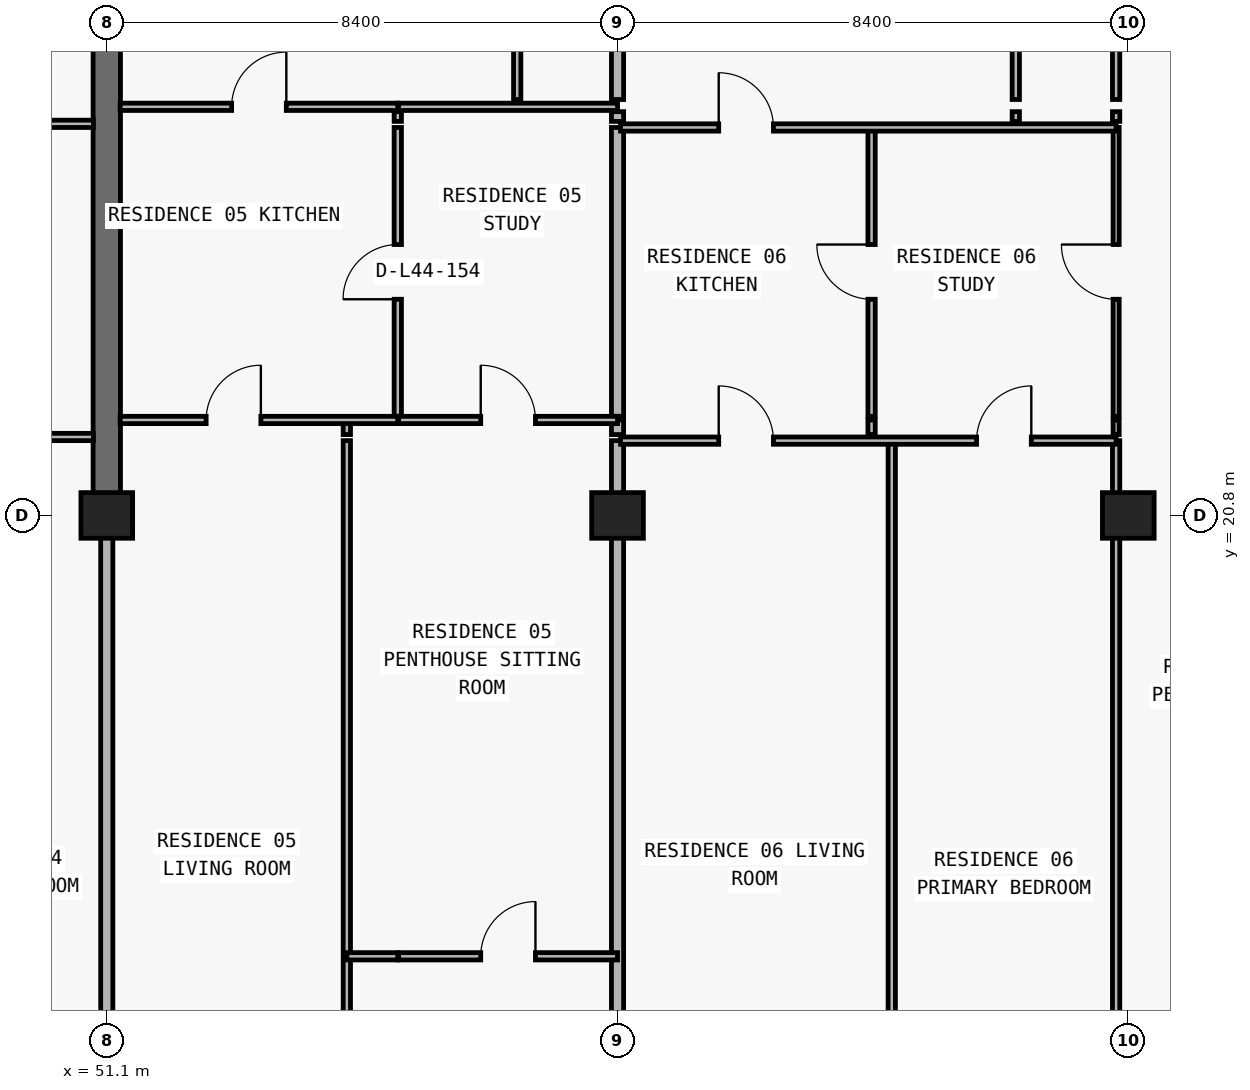
"""IFC4 building model, lengths in metres.
Left out: names, types, materials, properties, quantities, classifications, styles, units other than length and angle.
Written with IfcOpenShell. Run it as: python <this file> out.ifc"""

import sys

from ifc_helpers import new_model, si_unit, direction, frame, frame_2d, origin, origin_2d, place, context, subcontext, project, spatial, rectangle, extrude, element, fill, save


model = new_model("IFC4")
c1 = context("Model", 3, precision=1e-05, world=origin(), true_north=direction((0.0, 1.0)))
c2 = subcontext(c1, "Body", "Model", "MODEL_VIEW")
j1 = project(units=[si_unit("LENGTHUNIT", "METRE"), si_unit("PLANEANGLEUNIT", "RADIAN")], contexts=[c1])
p1 = place(None, origin())
s1 = spatial("IfcSite", under=j1, at=p1, CompositionType="ELEMENT")
p2 = place(p1, origin())
s2 = spatial("IfcBuilding", under=s1, at=p2, CompositionType="ELEMENT")
p3 = place(p2, frame((0.0, 0.0, 160.5)))
s3 = spatial("IfcBuildingStorey", under=s2, at=p3, CompositionType="ELEMENT", Elevation=160.5)
for number, where, z_axis, x_axis in (
    (1, (51.1, 20.8, 0.0), (0.0, 0.0, 1.0), (1.0, 0.0, 0.0)),
    (2, (59.5, 20.8, 0.0), (0.0, 0.0, 1.0), (1.0, 0.0, 0.0)),
    (3, (67.9, 20.8, 0.0), (0.0, 0.0, 1.0), (1.0, 0.0, 0.0)),
):
    element("IfcColumn", number, at=place(p3, frame(where, z_axis=z_axis, x_axis=x_axis)), inside=s3, PredefinedType="COLUMN", context=c2, shape_type="SweptSolid", body=[
        extrude(rectangle(XDim=0.85, YDim=0.75, at=origin_2d()), origin(), (0.0, 0.0, 1.0), 3.05),
    ])
p4 = place(p3, frame((51.1, 20.8, 0.0), z_axis=(0.0, 0.0, 1.0), x_axis=(0.0, 1.0, 0.0)))
e4 = element("IfcWall", 4, at=p4, inside=s3, PredefinedType="SHEAR", context=c2, shape_type="SweptSolid", body=[
    extrude(rectangle(XDim=8.6, YDim=0.45, at=frame_2d((4.3, 0.0))), origin(), (0.0, 0.0, 1.0), 3.05),
])
p5 = place(p3, frame((51.1, 11.24, 0.0), z_axis=(0.0, 0.0, 1.0), x_axis=(0.0, 1.0, 0.0)))
e5 = element("IfcWall", 5, at=p5, inside=s3, PredefinedType="PARTITIONING", context=c2, shape_type="SweptSolid", body=[
    extrude(rectangle(XDim=9.555, YDim=0.2, at=frame_2d((4.777, 0.0))), origin(), (0.0, 0.0, 1.0), 2.263),
])
p6 = place(p3, frame((55.048, 11.24, 0.0), z_axis=(0.0, 0.0, 1.0), x_axis=(0.0, 1.0, 0.0)))
e6 = element("IfcWall", 6, at=p6, inside=s3, PredefinedType="PARTITIONING", context=c2, shape_type="SweptSolid", body=[
    extrude(rectangle(XDim=10.79, YDim=0.12, at=frame_2d((5.395, 0.0))), origin(), (0.0, 0.0, 1.0), 3.05),
])
p7 = place(p3, frame((55.048, 22.13, 0.0), z_axis=(0.0, 0.0, 1.0), x_axis=(0.0, 1.0, 0.0)))
e7 = element("IfcWall", 7, at=p7, inside=s3, PredefinedType="PARTITIONING", context=c2, shape_type="SweptSolid", body=[
    extrude(rectangle(XDim=0.24, YDim=0.12, at=frame_2d((0.12, 0.0))), origin(), (0.0, 0.0, 1.0), 3.05),
])
p8 = place(p3, frame((55.886, 22.43, 0.0), z_axis=(0.0, 0.0, 1.0), x_axis=(0.0, 1.0, 0.0)))
e8 = element("IfcWall", 8, at=p8, inside=s3, PredefinedType="PARTITIONING", context=c2, shape_type="SweptSolid", body=[
    extrude(rectangle(XDim=4.75, YDim=0.12, at=frame_2d((2.375, 0.0))), origin(), (0.0, 0.0, 1.0), 3.05),
])
p9 = place(p8, frame((1.925, 0.0, 0.0)))
e9 = element("IfcOpeningElement", 9, at=p9, cuts=e8, PredefinedType="OPENING", context=c2, shape_type="SweptSolid", body=[
    extrude(rectangle(XDim=0.9, YDim=2.15, at=frame_2d((0.45, 1.075))), frame((0.0, 0.07, 0.0), z_axis=(0.0, -1.0, 0.0), x_axis=(1.0, 0.0, 0.0)), (0.0, 0.0, 1.0), 0.14),
])
p10 = place(p3, frame((55.886, 27.28, 0.0), z_axis=(0.0, 0.0, 1.0), x_axis=(0.0, 1.0, 0.0)))
e10 = element("IfcWall", 10, at=p10, inside=s3, PredefinedType="PARTITIONING", context=c2, shape_type="SweptSolid", body=[
    extrude(rectangle(XDim=0.16, YDim=0.12, at=frame_2d((0.08, 0.0))), origin(), (0.0, 0.0, 1.0), 3.05),
])
p11 = place(p3, frame((57.85, 27.64, 0.0), z_axis=(0.0, 0.0, 1.0), x_axis=(0.0, 1.0, 0.0)))
e11 = element("IfcWall", 11, at=p11, inside=s3, PredefinedType="PARTITIONING", context=c2, shape_type="SweptSolid", body=[
    extrude(rectangle(XDim=6.56, YDim=0.12, at=frame_2d((3.28, 0.0))), origin(), (0.0, 0.0, 1.0), 3.05),
])
p12 = place(p11, frame((2.855, 0.0, 0.0)))
e12 = element("IfcOpeningElement", 12, at=p12, cuts=e11, PredefinedType="OPENING", context=c2, shape_type="SweptSolid", body=[
    extrude(rectangle(XDim=0.85, YDim=2.1, at=frame_2d((0.425, 1.05))), frame((0.0, 0.07, 0.0), z_axis=(0.0, -1.0, 0.0), x_axis=(1.0, 0.0, 0.0)), (0.0, 0.0, 1.0), 0.14),
])
p13 = place(p3, frame((59.5, 11.24, 0.0), z_axis=(0.0, 0.0, 1.0), x_axis=(0.0, 1.0, 0.0)))
e13 = element("IfcWall", 13, at=p13, inside=s3, PredefinedType="PARTITIONING", context=c2, shape_type="SweptSolid", body=[
    extrude(rectangle(XDim=10.79, YDim=0.2, at=frame_2d((5.395, 0.0))), origin(), (0.0, 0.0, 1.0), 2.263),
])
p14 = place(p3, frame((59.5, 22.13, 0.0), z_axis=(0.0, 0.0, 1.0), x_axis=(0.0, 1.0, 0.0)))
e14 = element("IfcWall", 14, at=p14, inside=s3, PredefinedType="PARTITIONING", context=c2, shape_type="SweptSolid", body=[
    extrude(rectangle(XDim=0.24, YDim=0.2, at=frame_2d((0.12, 0.0))), origin(), (0.0, 0.0, 1.0), 2.263),
])
p15 = place(p3, frame((59.5, 22.43, 0.0), z_axis=(0.0, 0.0, 1.0), x_axis=(0.0, 1.0, 0.0)))
e15 = element("IfcWall", 15, at=p15, inside=s3, PredefinedType="PARTITIONING", context=c2, shape_type="SweptSolid", body=[
    extrude(rectangle(XDim=4.75, YDim=0.2, at=frame_2d((2.375, 0.0))), origin(), (0.0, 0.0, 1.0), 2.263),
])
p16 = place(p3, frame((59.5, 27.28, 0.0), z_axis=(0.0, 0.0, 1.0), x_axis=(0.0, 1.0, 0.0)))
e16 = element("IfcWall", 16, at=p16, inside=s3, PredefinedType="PARTITIONING", context=c2, shape_type="SweptSolid", body=[
    extrude(rectangle(XDim=0.16, YDim=0.2, at=frame_2d((0.08, 0.0))), origin(), (0.0, 0.0, 1.0), 2.263),
])
p17 = place(p3, frame((59.5, 27.64, 0.0), z_axis=(0.0, 0.0, 1.0), x_axis=(0.0, 1.0, 0.0)))
e17 = element("IfcWall", 17, at=p17, inside=s3, PredefinedType="PARTITIONING", context=c2, shape_type="SweptSolid", body=[
    extrude(rectangle(XDim=6.56, YDim=0.2, at=frame_2d((3.28, 0.0))), origin(), (0.0, 0.0, 1.0), 2.263),
])
p18 = place(p3, frame((63.678, 22.13, 0.0), z_axis=(0.0, 0.0, 1.0), x_axis=(0.0, 1.0, 0.0)))
e18 = element("IfcWall", 18, at=p18, inside=s3, PredefinedType="PARTITIONING", context=c2, shape_type="SweptSolid", body=[
    extrude(rectangle(XDim=0.24, YDim=0.12, at=frame_2d((0.12, 0.0))), origin(), (0.0, 0.0, 1.0), 3.05),
])
p19 = place(p3, frame((63.678, 22.43, 0.0), z_axis=(0.0, 0.0, 1.0), x_axis=(0.0, 1.0, 0.0)))
e19 = element("IfcWall", 19, at=p19, inside=s3, PredefinedType="PARTITIONING", context=c2, shape_type="SweptSolid", body=[
    extrude(rectangle(XDim=4.75, YDim=0.12, at=frame_2d((2.375, 0.0))), origin(), (0.0, 0.0, 1.0), 3.05),
])
p20 = place(p19, frame((1.925, 0.0, 0.0)))
e20 = element("IfcOpeningElement", 20, at=p20, cuts=e19, PredefinedType="OPENING", context=c2, shape_type="SweptSolid", body=[
    extrude(rectangle(XDim=0.9, YDim=2.15, at=frame_2d((0.45, 1.075))), frame((0.0, 0.07, 0.0), z_axis=(0.0, -1.0, 0.0), x_axis=(1.0, 0.0, 0.0)), (0.0, 0.0, 1.0), 0.14),
])
p21 = place(p3, frame((64.01, 11.24, 0.0), z_axis=(0.0, 0.0, 1.0), x_axis=(0.0, 1.0, 0.0)))
e21 = element("IfcWall", 21, at=p21, inside=s3, PredefinedType="PARTITIONING", context=c2, shape_type="SweptSolid", body=[
    extrude(rectangle(XDim=10.79, YDim=0.12, at=frame_2d((5.395, 0.0))), origin(), (0.0, 0.0, 1.0), 3.05),
])
p22 = place(p3, frame((66.05, 27.28, 0.0), z_axis=(0.0, 0.0, 1.0), x_axis=(0.0, 1.0, 0.0)))
e22 = element("IfcWall", 22, at=p22, inside=s3, PredefinedType="PARTITIONING", context=c2, shape_type="SweptSolid", body=[
    extrude(rectangle(XDim=0.16, YDim=0.12, at=frame_2d((0.08, 0.0))), origin(), (0.0, 0.0, 1.0), 3.05),
])
p23 = place(p3, frame((66.05, 27.64, 0.0), z_axis=(0.0, 0.0, 1.0), x_axis=(0.0, 1.0, 0.0)))
e23 = element("IfcWall", 23, at=p23, inside=s3, PredefinedType="PARTITIONING", context=c2, shape_type="SweptSolid", body=[
    extrude(rectangle(XDim=6.56, YDim=0.12, at=frame_2d((3.28, 0.0))), origin(), (0.0, 0.0, 1.0), 3.05),
])
p24 = place(p23, frame((2.855, 0.0, 0.0)))
e24 = element("IfcOpeningElement", 24, at=p24, cuts=e23, PredefinedType="OPENING", context=c2, shape_type="SweptSolid", body=[
    extrude(rectangle(XDim=0.85, YDim=2.1, at=frame_2d((0.425, 1.05))), frame((0.0, 0.07, 0.0), z_axis=(0.0, -1.0, 0.0), x_axis=(1.0, 0.0, 0.0)), (0.0, 0.0, 1.0), 0.14),
])
p25 = place(p3, frame((67.7, 11.32, 0.0), z_axis=(0.0, 0.0, 1.0), x_axis=(0.0, 1.0, 0.0)))
e25 = element("IfcWall", 25, at=p25, inside=s3, PredefinedType="PARTITIONING", context=c2, shape_type="SweptSolid", body=[
    extrude(rectangle(XDim=10.71, YDim=0.12, at=frame_2d((5.355, 0.0))), origin(), (0.0, 0.0, 1.0), 2.263),
])
p26 = place(p3, frame((67.7, 22.13, 0.0), z_axis=(0.0, 0.0, 1.0), x_axis=(0.0, 1.0, 0.0)))
e26 = element("IfcWall", 26, at=p26, inside=s3, PredefinedType="MOVABLE", context=c2, shape_type="SweptSolid", body=[
    extrude(rectangle(XDim=0.24, YDim=0.1, at=frame_2d((0.12, 0.0))), origin(), (0.0, 0.0, 1.0), 2.263),
])
p27 = place(p3, frame((67.7, 22.43, 0.0), z_axis=(0.0, 0.0, 1.0), x_axis=(0.0, 1.0, 0.0)))
e27 = element("IfcWall", 27, at=p27, inside=s3, PredefinedType="MOVABLE", context=c2, shape_type="SweptSolid", body=[
    extrude(rectangle(XDim=4.75, YDim=0.1, at=frame_2d((2.375, 0.0))), origin(), (0.0, 0.0, 1.0), 2.263),
])
p28 = place(p27, frame((1.925, 0.0, 0.0)))
e28 = element("IfcOpeningElement", 28, at=p28, cuts=e27, PredefinedType="OPENING", context=c2, shape_type="SweptSolid", body=[
    extrude(rectangle(XDim=0.9, YDim=2.15, at=frame_2d((0.45, 1.075))), frame((0.0, 0.06, 0.0), z_axis=(0.0, -1.0, 0.0), x_axis=(1.0, 0.0, 0.0)), (0.0, 0.0, 1.0), 0.12),
])
p29 = place(p3, frame((67.7, 27.28, 0.0), z_axis=(0.0, 0.0, 1.0), x_axis=(0.0, 1.0, 0.0)))
e29 = element("IfcWall", 29, at=p29, inside=s3, PredefinedType="PARTITIONING", context=c2, shape_type="SweptSolid", body=[
    extrude(rectangle(XDim=0.16, YDim=0.12, at=frame_2d((0.08, 0.0))), origin(), (0.0, 0.0, 1.0), 2.263),
])
p30 = place(p3, frame((67.7, 27.64, 0.0), z_axis=(0.0, 0.0, 1.0), x_axis=(0.0, 1.0, 0.0)))
e30 = element("IfcWall", 30, at=p30, inside=s3, PredefinedType="PARTITIONING", context=c2, shape_type="SweptSolid", body=[
    extrude(rectangle(XDim=6.56, YDim=0.12, at=frame_2d((3.28, 0.0))), origin(), (0.0, 0.0, 1.0), 2.263),
])
p31 = place(p3, frame((55.048, 13.55, 0.0), z_axis=(0.0, 0.0, 1.0), x_axis=(1.0, 0.0, 0.0)))
e31 = element("IfcWall", 31, at=p31, inside=s3, PredefinedType="PARTITIONING", context=c2, shape_type="SweptSolid", body=[
    extrude(rectangle(XDim=0.838, YDim=0.12, at=frame_2d((0.419, 0.0))), origin(), (0.0, 0.0, 1.0), 3.05),
])
p32 = place(p3, frame((55.9, 13.55, 0.0), z_axis=(0.0, 0.0, 1.0), x_axis=(1.0, 0.0, 0.0)))
e32 = element("IfcWall", 32, at=p32, inside=s3, PredefinedType="PARTITIONING", context=c2, shape_type="SweptSolid", body=[
    extrude(rectangle(XDim=3.6, YDim=0.12, at=frame_2d((1.8, 0.0))), origin(), (0.0, 0.0, 1.0), 3.05),
])
p33 = place(p32, frame((1.35, 0.0, 0.0)))
e33 = element("IfcOpeningElement", 33, at=p33, cuts=e32, PredefinedType="OPENING", context=c2, shape_type="SweptSolid", body=[
    extrude(rectangle(XDim=0.9, YDim=2.15, at=frame_2d((0.45, 1.075))), frame((0.0, 0.07, 0.0), z_axis=(0.0, -1.0, 0.0), x_axis=(1.0, 0.0, 0.0)), (0.0, 0.0, 1.0), 0.14),
])
p34 = place(p3, frame((59.55, 22.03, 0.0), z_axis=(0.0, 0.0, 1.0), x_axis=(1.0, 0.0, 0.0)))
e34 = element("IfcWall", 34, at=p34, inside=s3, PredefinedType="PARTITIONING", context=c2, shape_type="SweptSolid", body=[
    extrude(rectangle(XDim=8.15, YDim=0.12, at=frame_2d((4.075, 0.0))), origin(), (0.0, 0.0, 1.0), 3.05),
])
p35 = place(p34, frame((1.614, 0.0, 0.0)))
e35 = element("IfcOpeningElement", 35, at=p35, cuts=e34, PredefinedType="OPENING", context=c2, shape_type="SweptSolid", body=[
    extrude(rectangle(XDim=0.9, YDim=2.15, at=frame_2d((0.45, 1.075))), frame((0.0, 0.07, 0.0), z_axis=(0.0, -1.0, 0.0), x_axis=(1.0, 0.0, 0.0)), (0.0, 0.0, 1.0), 0.14),
])
p36 = place(p34, frame((5.855, 0.0, 0.0)))
e36 = element("IfcOpeningElement", 36, at=p36, cuts=e34, PredefinedType="OPENING", context=c2, shape_type="SweptSolid", body=[
    extrude(rectangle(XDim=0.9, YDim=2.15, at=frame_2d((0.45, 1.075))), frame((0.0, 0.07, 0.0), z_axis=(0.0, -1.0, 0.0), x_axis=(1.0, 0.0, 0.0)), (0.0, 0.0, 1.0), 0.14),
])
p37 = place(p3, frame((42.7, 22.09, 0.0), z_axis=(0.0, 0.0, 1.0), x_axis=(1.0, 0.0, 0.0)))
e37 = element("IfcWall", 37, at=p37, inside=s3, PredefinedType="PARTITIONING", context=c2, shape_type="SweptSolid", body=[
    extrude(rectangle(XDim=8.18, YDim=0.12, at=frame_2d((4.09, 0.0))), origin(), (0.0, 0.0, 1.0), 3.05),
])
p38 = place(p37, frame((1.818, 0.0, 0.0)))
e38 = element("IfcOpeningElement", 38, at=p38, cuts=e37, PredefinedType="OPENING", context=c2, shape_type="SweptSolid", body=[
    extrude(rectangle(XDim=0.9, YDim=2.15, at=frame_2d((0.45, 1.075))), frame((0.0, 0.07, 0.0), z_axis=(0.0, -1.0, 0.0), x_axis=(1.0, 0.0, 0.0)), (0.0, 0.0, 1.0), 0.14),
])
p39 = place(p37, frame((5.95, 0.0, 0.0)))
e39 = element("IfcOpeningElement", 39, at=p39, cuts=e37, PredefinedType="OPENING", context=c2, shape_type="SweptSolid", body=[
    extrude(rectangle(XDim=0.9, YDim=2.15, at=frame_2d((0.45, 1.075))), frame((0.0, 0.07, 0.0), z_axis=(0.0, -1.0, 0.0), x_axis=(1.0, 0.0, 0.0)), (0.0, 0.0, 1.0), 0.14),
])
p40 = place(p3, frame((51.32, 22.37, 0.0), z_axis=(0.0, 0.0, 1.0), x_axis=(1.0, 0.0, 0.0)))
e40 = element("IfcWall", 40, at=p40, inside=s3, PredefinedType="PARTITIONING", context=c2, shape_type="SweptSolid", body=[
    extrude(rectangle(XDim=4.566, YDim=0.12, at=frame_2d((2.283, 0.0))), origin(), (0.0, 0.0, 1.0), 3.05),
])
p41 = place(p40, frame((1.414, 0.0, 0.0)))
e41 = element("IfcOpeningElement", 41, at=p41, cuts=e40, PredefinedType="OPENING", context=c2, shape_type="SweptSolid", body=[
    extrude(rectangle(XDim=0.9, YDim=2.15, at=frame_2d((0.45, 1.075))), frame((0.0, 0.07, 0.0), z_axis=(0.0, -1.0, 0.0), x_axis=(1.0, 0.0, 0.0)), (0.0, 0.0, 1.0), 0.14),
])
p42 = place(p3, frame((55.9, 22.37, 0.0), z_axis=(0.0, 0.0, 1.0), x_axis=(1.0, 0.0, 0.0)))
e42 = element("IfcWall", 42, at=p42, inside=s3, PredefinedType="PARTITIONING", context=c2, shape_type="SweptSolid", body=[
    extrude(rectangle(XDim=3.6, YDim=0.12, at=frame_2d((1.8, 0.0))), origin(), (0.0, 0.0, 1.0), 3.05),
])
p43 = place(p42, frame((1.35, 0.0, 0.0)))
e43 = element("IfcOpeningElement", 43, at=p43, cuts=e42, PredefinedType="OPENING", context=c2, shape_type="SweptSolid", body=[
    extrude(rectangle(XDim=0.9, YDim=2.15, at=frame_2d((0.45, 1.075))), frame((0.0, 0.07, 0.0), z_axis=(0.0, -1.0, 0.0), x_axis=(1.0, 0.0, 0.0)), (0.0, 0.0, 1.0), 0.14),
])
p44 = place(p3, frame((59.55, 27.18, 0.0), z_axis=(0.0, 0.0, 1.0), x_axis=(1.0, 0.0, 0.0)))
e44 = element("IfcWall", 44, at=p44, inside=s3, PredefinedType="PARTITIONING", context=c2, shape_type="SweptSolid", body=[
    extrude(rectangle(XDim=8.15, YDim=0.12, at=frame_2d((4.075, 0.0))), origin(), (0.0, 0.0, 1.0), 3.05),
])
p45 = place(p44, frame((1.614, 0.0, 0.0)))
e45 = element("IfcOpeningElement", 45, at=p45, cuts=e44, PredefinedType="OPENING", context=c2, shape_type="SweptSolid", body=[
    extrude(rectangle(XDim=0.9, YDim=2.15, at=frame_2d((0.45, 1.075))), frame((0.0, 0.07, 0.0), z_axis=(0.0, -1.0, 0.0), x_axis=(1.0, 0.0, 0.0)), (0.0, 0.0, 1.0), 0.14),
])
p46 = place(p3, frame((42.7, 27.24, 0.0), z_axis=(0.0, 0.0, 1.0), x_axis=(1.0, 0.0, 0.0)))
e46 = element("IfcWall", 46, at=p46, inside=s3, PredefinedType="PARTITIONING", context=c2, shape_type="SweptSolid", body=[
    extrude(rectangle(XDim=8.18, YDim=0.12, at=frame_2d((4.09, 0.0))), origin(), (0.0, 0.0, 1.0), 3.05),
])
p47 = place(p46, frame((1.818, 0.0, 0.0)))
e47 = element("IfcOpeningElement", 47, at=p47, cuts=e46, PredefinedType="OPENING", context=c2, shape_type="SweptSolid", body=[
    extrude(rectangle(XDim=0.9, YDim=2.15, at=frame_2d((0.45, 1.075))), frame((0.0, 0.07, 0.0), z_axis=(0.0, -1.0, 0.0), x_axis=(1.0, 0.0, 0.0)), (0.0, 0.0, 1.0), 0.14),
])
p48 = place(p3, frame((51.32, 27.52, 0.0), z_axis=(0.0, 0.0, 1.0), x_axis=(1.0, 0.0, 0.0)))
e48 = element("IfcWall", 48, at=p48, inside=s3, PredefinedType="PARTITIONING", context=c2, shape_type="SweptSolid", body=[
    extrude(rectangle(XDim=4.566, YDim=0.12, at=frame_2d((2.283, 0.0))), origin(), (0.0, 0.0, 1.0), 3.05),
])
p49 = place(p48, frame((1.833, 0.0, 0.0)))
e49 = element("IfcOpeningElement", 49, at=p49, cuts=e48, PredefinedType="OPENING", context=c2, shape_type="SweptSolid", body=[
    extrude(rectangle(XDim=0.9, YDim=2.15, at=frame_2d((0.45, 1.075))), frame((0.0, 0.07, 0.0), z_axis=(0.0, -1.0, 0.0), x_axis=(1.0, 0.0, 0.0)), (0.0, 0.0, 1.0), 0.14),
])
p50 = place(p3, frame((55.9, 27.52, 0.0), z_axis=(0.0, 0.0, 1.0), x_axis=(1.0, 0.0, 0.0)))
e50 = element("IfcWall", 50, at=p50, inside=s3, PredefinedType="PARTITIONING", context=c2, shape_type="SweptSolid", body=[
    extrude(rectangle(XDim=3.6, YDim=0.12, at=frame_2d((1.8, 0.0))), origin(), (0.0, 0.0, 1.0), 3.05),
])
p51 = place(p49, origin())
e51 = element("IfcDoor", 51, at=p51, inside=s3, OperationType="SINGLE_SWING_RIGHT", PredefinedType="DOOR", context=c2, shape_type="SweptSolid", body=[
    extrude(rectangle(XDim=0.9, YDim=2.15, at=frame_2d((0.45, 1.075))), frame((0.0, 0.025, 0.0), z_axis=(0.0, -1.0, 0.0), x_axis=(1.0, 0.0, 0.0)), (0.0, 0.0, 1.0), 0.05),
])
fill(e49, e51)
p52 = place(p9, origin())
e52 = element("IfcDoor", 52, at=p52, inside=s3, OperationType="SINGLE_SWING_LEFT", PredefinedType="DOOR", context=c2, shape_type="SweptSolid", body=[
    extrude(rectangle(XDim=0.9, YDim=2.15, at=frame_2d((0.45, 1.075))), frame((0.0, 0.025, 0.0), z_axis=(0.0, -1.0, 0.0), x_axis=(1.0, 0.0, 0.0)), (0.0, 0.0, 1.0), 0.05),
])
fill(e9, e52)
p53 = place(p41, origin())
e53 = element("IfcDoor", 53, at=p53, inside=s3, OperationType="SINGLE_SWING_RIGHT", PredefinedType="DOOR", context=c2, shape_type="SweptSolid", body=[
    extrude(rectangle(XDim=0.9, YDim=2.15, at=frame_2d((0.45, 1.075))), frame((0.0, 0.025, 0.0), z_axis=(0.0, -1.0, 0.0), x_axis=(1.0, 0.0, 0.0)), (0.0, 0.0, 1.0), 0.05),
])
fill(e41, e53)
p54 = place(p43, origin())
e54 = element("IfcDoor", 54, at=p54, inside=s3, OperationType="SINGLE_SWING_LEFT", PredefinedType="DOOR", context=c2, shape_type="SweptSolid", body=[
    extrude(rectangle(XDim=0.9, YDim=2.15, at=frame_2d((0.45, 1.075))), frame((0.0, 0.025, 0.0), z_axis=(0.0, -1.0, 0.0), x_axis=(1.0, 0.0, 0.0)), (0.0, 0.0, 1.0), 0.05),
])
fill(e43, e54)
p55 = place(p33, origin())
e55 = element("IfcDoor", 55, at=p55, inside=s3, OperationType="SINGLE_SWING_RIGHT", PredefinedType="DOOR", context=c2, shape_type="SweptSolid", body=[
    extrude(rectangle(XDim=0.9, YDim=2.15, at=frame_2d((0.45, 1.075))), frame((0.0, 0.025, 0.0), z_axis=(0.0, -1.0, 0.0), x_axis=(1.0, 0.0, 0.0)), (0.0, 0.0, 1.0), 0.05),
])
fill(e33, e55)
p56 = place(p45, origin())
e56 = element("IfcDoor", 56, at=p56, inside=s3, OperationType="SINGLE_SWING_LEFT", PredefinedType="DOOR", context=c2, shape_type="SweptSolid", body=[
    extrude(rectangle(XDim=0.9, YDim=2.15, at=frame_2d((0.45, 1.075))), frame((0.0, 0.025, 0.0), z_axis=(0.0, -1.0, 0.0), x_axis=(1.0, 0.0, 0.0)), (0.0, 0.0, 1.0), 0.05),
])
fill(e45, e56)
p57 = place(p20, origin())
e57 = element("IfcDoor", 57, at=p57, inside=s3, OperationType="SINGLE_SWING_RIGHT", PredefinedType="DOOR", context=c2, shape_type="SweptSolid", body=[
    extrude(rectangle(XDim=0.9, YDim=2.15, at=frame_2d((0.45, 1.075))), frame((0.0, 0.025, 0.0), z_axis=(0.0, -1.0, 0.0), x_axis=(1.0, 0.0, 0.0)), (0.0, 0.0, 1.0), 0.05),
])
fill(e20, e57)
p58 = place(p35, origin())
e58 = element("IfcDoor", 58, at=p58, inside=s3, OperationType="SINGLE_SWING_LEFT", PredefinedType="DOOR", context=c2, shape_type="SweptSolid", body=[
    extrude(rectangle(XDim=0.9, YDim=2.15, at=frame_2d((0.45, 1.075))), frame((0.0, 0.025, 0.0), z_axis=(0.0, -1.0, 0.0), x_axis=(1.0, 0.0, 0.0)), (0.0, 0.0, 1.0), 0.05),
])
fill(e35, e58)
p59 = place(p36, origin())
e59 = element("IfcDoor", 59, at=p59, inside=s3, OperationType="SINGLE_SWING_RIGHT", PredefinedType="DOOR", context=c2, shape_type="SweptSolid", body=[
    extrude(rectangle(XDim=0.9, YDim=2.15, at=frame_2d((0.45, 1.075))), frame((0.0, 0.025, 0.0), z_axis=(0.0, -1.0, 0.0), x_axis=(1.0, 0.0, 0.0)), (0.0, 0.0, 1.0), 0.05),
])
fill(e36, e59)
p60 = place(p28, origin())
e60 = element("IfcDoor", 60, at=p60, inside=s3, OperationType="SINGLE_SWING_RIGHT", PredefinedType="DOOR", context=c2, shape_type="SweptSolid", body=[
    extrude(rectangle(XDim=0.9, YDim=2.15, at=frame_2d((0.45, 1.075))), frame((0.0, 0.025, 0.0), z_axis=(0.0, -1.0, 0.0), x_axis=(1.0, 0.0, 0.0)), (0.0, 0.0, 1.0), 0.05),
])
fill(e28, e60)
save(model, sys.argv[1])
